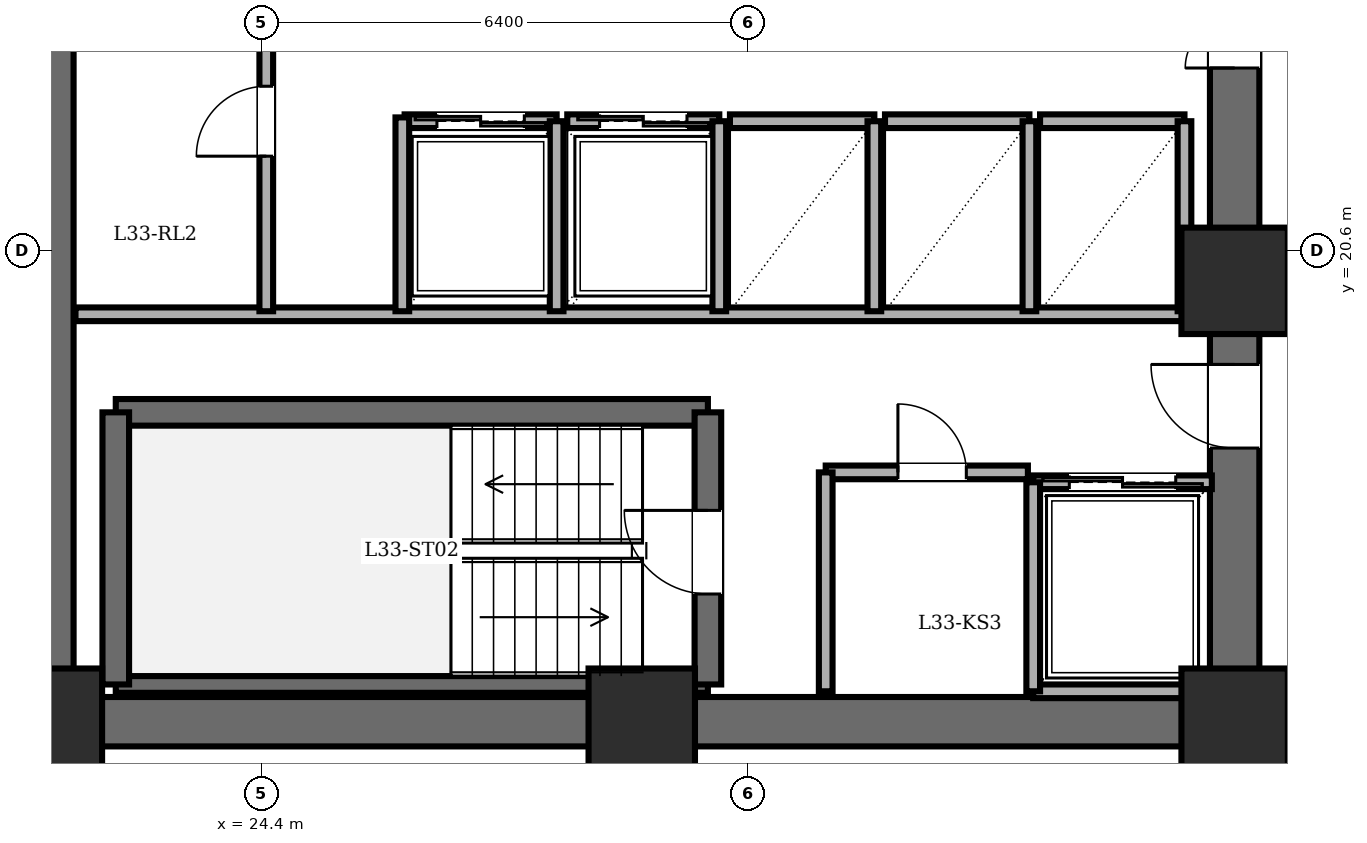
"""IFC4 building model, lengths in metres.
Left out: names, types, materials, properties, quantities, classifications, styles, units other than length and angle.
Written with IfcOpenShell. Run it as: python <this file> out.ifc"""

import sys

from ifc_helpers import new_model, si_unit, direction, frame, frame_2d, origin, origin_2d, place, context, subcontext, project, spatial, rectangle, extrude, element, fill, save


model = new_model("IFC4")
c1 = context("Model", 3, precision=1e-05, world=origin(), true_north=direction((0.0, 1.0)))
c2 = subcontext(c1, "Body", "Model", "MODEL_VIEW")
j1 = project(units=[si_unit("LENGTHUNIT", "METRE"), si_unit("PLANEANGLEUNIT", "RADIAN")], contexts=[c1])
p1 = place(None, origin())
s1 = spatial("IfcSite", under=j1, at=p1, CompositionType="ELEMENT")
p2 = place(p1, origin())
s2 = spatial("IfcBuilding", under=s1, at=p2, CompositionType="ELEMENT")
p3 = place(p2, frame((0.0, 0.0, 125.9)))
s3 = spatial("IfcBuildingStorey", under=s2, at=p3, CompositionType="ELEMENT", Elevation=125.9)
for number, where, z_axis, x_axis in (
    (1, (21.6, 14.4, 0.0), (0.0, 0.0, 1.0), (1.0, 0.0, 0.0)),
    (2, (29.4, 14.4, 0.0), (0.0, 0.0, 1.0), (1.0, 0.0, 0.0)),
    (3, (37.2, 14.4, 0.0), (0.0, 0.0, 1.0), (1.0, 0.0, 0.0)),
    (4, (37.2, 20.2, 0.0), (0.0, 0.0, 1.0), (1.0, 0.0, 0.0)),
):
    element("IfcColumn", number, at=place(p3, frame(where, z_axis=z_axis, x_axis=x_axis)), inside=s3, PredefinedType="COLUMN", context=c2, shape_type="SweptSolid", body=[
        extrude(rectangle(XDim=1.4, YDim=1.4, at=origin_2d()), origin(), (0.0, 0.0, 1.0), 3.6),
    ])
p4 = place(p3, frame((21.6, 14.4, 0.0), z_axis=(0.0, 0.0, 1.0), x_axis=(0.0, 1.0, 0.0)))
e5 = element("IfcWall", 5, at=p4, inside=s3, PredefinedType="SHEAR", context=c2, shape_type="SweptSolid", body=[
    extrude(rectangle(XDim=19.2, YDim=0.65, at=frame_2d((9.6, 0.0))), origin(), (0.0, 0.0, 1.0), 3.4),
])
p5 = place(p3, frame((37.2, 14.4, 0.0), z_axis=(0.0, 0.0, 1.0), x_axis=(-1.0, 0.0, 0.0)))
e6 = element("IfcWall", 6, at=p5, inside=s3, PredefinedType="SHEAR", context=c2, shape_type="SweptSolid", body=[
    extrude(rectangle(XDim=15.6, YDim=0.65, at=frame_2d((7.8, 0.0))), origin(), (0.0, 0.0, 1.0), 3.4),
])
p6 = place(p3, frame((37.2, 14.4, 0.0), z_axis=(0.0, 0.0, 1.0), x_axis=(0.0, 1.0, 0.0)))
e7 = element("IfcWall", 7, at=p6, inside=s3, PredefinedType="SHEAR", context=c2, shape_type="SweptSolid", body=[
    extrude(rectangle(XDim=19.2, YDim=0.65, at=frame_2d((9.6, 0.0))), origin(), (0.0, 0.0, 1.0), 3.4),
])
p7 = place(p6, frame((15.8, 0.0, 0.0)))
e8 = element("IfcOpeningElement", 8, at=p7, cuts=e7, PredefinedType="OPENING", context=c2, shape_type="SweptSolid", body=[
    extrude(rectangle(XDim=1.15, YDim=2.15, at=frame_2d((0.575, 1.075))), frame((0.0, 0.335, 0.0), z_axis=(0.0, -1.0, 0.0), x_axis=(1.0, 0.0, 0.0)), (0.0, 0.0, 1.0), 0.67),
])
p8 = place(p6, frame((3.6, 0.0, 0.0)))
e9 = element("IfcOpeningElement", 9, at=p8, cuts=e7, PredefinedType="OPENING", context=c2, shape_type="SweptSolid", body=[
    extrude(rectangle(XDim=1.1, YDim=2.15, at=frame_2d((0.55, 1.075))), frame((0.0, 0.335, 0.0), z_axis=(0.0, -1.0, 0.0), x_axis=(1.0, 0.0, 0.0)), (0.0, 0.0, 1.0), 0.67),
])
p9 = place(p6, frame((8.6, 0.0, 0.0)))
e10 = element("IfcOpeningElement", 10, at=p9, cuts=e7, PredefinedType="OPENING", context=c2, shape_type="SweptSolid", body=[
    extrude(rectangle(XDim=1.3, YDim=2.2, at=frame_2d((0.65, 1.1))), frame((0.0, 0.335, 0.0), z_axis=(0.0, -1.0, 0.0), x_axis=(1.0, 0.0, 0.0)), (0.0, 0.0, 1.0), 0.67),
])
p10 = place(p3, frame((22.48, 18.47, 0.0), z_axis=(0.0, 0.0, 1.0), x_axis=(1.0, 0.0, 0.0)))
e11 = element("IfcWall", 11, at=p10, inside=s3, PredefinedType="SOLIDWALL", context=c2, shape_type="SweptSolid", body=[
    extrude(rectangle(XDim=7.79, YDim=0.35, at=frame_2d((3.895, 0.0))), origin(), (0.0, 0.0, 1.0), 3.4),
])
p11 = place(p3, frame((22.48, 14.89, 0.0), z_axis=(0.0, 0.0, 1.0), x_axis=(1.0, 0.0, 0.0)))
e12 = element("IfcWall", 12, at=p11, inside=s3, PredefinedType="PARTITIONING", context=c2, shape_type="SweptSolid", body=[
    extrude(rectangle(XDim=7.79, YDim=0.22, at=frame_2d((3.895, 0.0))), origin(), (0.0, 0.0, 1.0), 3.4),
])
p12 = place(p3, frame((22.48, 14.89, 0.0), z_axis=(0.0, 0.0, 1.0), x_axis=(0.0, 1.0, 0.0)))
e13 = element("IfcWall", 13, at=p12, inside=s3, PredefinedType="SOLIDWALL", context=c2, shape_type="SweptSolid", body=[
    extrude(rectangle(XDim=3.58, YDim=0.35, at=frame_2d((1.79, 0.0))), origin(), (0.0, 0.0, 1.0), 3.4),
])
p13 = place(p3, frame((30.27, 14.89, 0.0), z_axis=(0.0, 0.0, 1.0), x_axis=(0.0, 1.0, 0.0)))
e14 = element("IfcWall", 14, at=p13, inside=s3, PredefinedType="SOLIDWALL", context=c2, shape_type="SweptSolid", body=[
    extrude(rectangle(XDim=3.58, YDim=0.35, at=frame_2d((1.79, 0.0))), origin(), (0.0, 0.0, 1.0), 3.4),
])
p14 = place(p13, frame((1.19, 0.0, 0.0)))
e15 = element("IfcOpeningElement", 15, at=p14, cuts=e14, PredefinedType="OPENING", context=c2, shape_type="SweptSolid", body=[
    extrude(rectangle(XDim=1.1, YDim=2.15, at=frame_2d((0.55, 1.075))), frame((0.0, 0.185, 0.0), z_axis=(0.0, -1.0, 0.0), x_axis=(1.0, 0.0, 0.0)), (0.0, 0.0, 1.0), 0.37),
])
p15 = place(p3, frame((21.95, 19.76, 0.0), z_axis=(0.0, 0.0, 1.0), x_axis=(1.0, 0.0, 0.0)))
e16 = element("IfcWall", 16, at=p15, inside=s3, PredefinedType="PARTITIONING", context=c2, shape_type="SweptSolid", body=[
    extrude(rectangle(XDim=14.87, YDim=0.18, at=frame_2d((7.435, 0.0))), origin(), (0.0, 0.0, 1.0), 3.4),
])
p16 = place(p3, frame((31.82, 17.68, 0.0), z_axis=(0.0, 0.0, 1.0), x_axis=(1.0, 0.0, 0.0)))
e17 = element("IfcWall", 17, at=p16, inside=s3, PredefinedType="PARTITIONING", context=c2, shape_type="SweptSolid", body=[
    extrude(rectangle(XDim=2.66, YDim=0.18, at=frame_2d((1.33, 0.0))), origin(), (0.0, 0.0, 1.0), 3.4),
])
p17 = place(p16, frame((0.95, 0.0, 0.0)))
e18 = element("IfcOpeningElement", 18, at=p17, cuts=e17, PredefinedType="OPENING", context=c2, shape_type="SweptSolid", body=[
    extrude(rectangle(XDim=0.9, YDim=2.05, at=frame_2d((0.45, 1.025))), frame((0.0, 0.1, 0.0), z_axis=(0.0, -1.0, 0.0), x_axis=(1.0, 0.0, 0.0)), (0.0, 0.0, 1.0), 0.2),
])
p18 = place(p3, frame((31.82, 14.8, 0.0), z_axis=(0.0, 0.0, 1.0), x_axis=(0.0, 1.0, 0.0)))
e19 = element("IfcWall", 19, at=p18, inside=s3, PredefinedType="PARTITIONING", context=c2, shape_type="SweptSolid", body=[
    extrude(rectangle(XDim=2.88, YDim=0.18, at=frame_2d((1.44, 0.0))), origin(), (0.0, 0.0, 1.0), 3.4),
])
p19 = place(p3, frame((34.55, 17.55, 0.0), z_axis=(0.0, 0.0, 1.0), x_axis=(1.0, 0.0, 0.0)))
e20 = element("IfcWall", 20, at=p19, inside=s3, PredefinedType="PARTITIONING", context=c2, shape_type="SweptSolid", body=[
    extrude(rectangle(XDim=2.35, YDim=0.18, at=frame_2d((1.175, 0.0))), origin(), (0.0, 0.0, 1.0), 3.4),
])
p20 = place(p19, frame((0.475, 0.0, 0.0)))
e21 = element("IfcOpeningElement", 21, at=p20, cuts=e20, PredefinedType="OPENING", context=c2, shape_type="SweptSolid", body=[
    extrude(rectangle(XDim=1.4, YDim=2.3, at=frame_2d((0.7, 1.15))), frame((0.0, 0.1, 0.0), z_axis=(0.0, -1.0, 0.0), x_axis=(1.0, 0.0, 0.0)), (0.0, 0.0, 1.0), 0.2),
])
p21 = place(p3, frame((36.9, 14.8, 0.0), z_axis=(0.0, 0.0, 1.0), x_axis=(-1.0, 0.0, 0.0)))
e22 = element("IfcWall", 22, at=p21, inside=s3, PredefinedType="PARTITIONING", context=c2, shape_type="SweptSolid", body=[
    extrude(rectangle(XDim=2.35, YDim=0.18, at=frame_2d((1.175, 0.0))), origin(), (0.0, 0.0, 1.0), 3.4),
])
p22 = place(p3, frame((34.55, 17.55, 0.0), z_axis=(0.0, 0.0, 1.0), x_axis=(0.0, -1.0, 0.0)))
e23 = element("IfcWall", 23, at=p22, inside=s3, PredefinedType="PARTITIONING", context=c2, shape_type="SweptSolid", body=[
    extrude(rectangle(XDim=2.75, YDim=0.18, at=frame_2d((1.375, 0.0))), origin(), (0.0, 0.0, 1.0), 3.4),
])
p23 = place(p3, frame((26.28, 22.3, 0.0), z_axis=(0.0, 0.0, 1.0), x_axis=(1.0, 0.0, 0.0)))
e24 = element("IfcWall", 24, at=p23, inside=s3, PredefinedType="PARTITIONING", context=c2, shape_type="SweptSolid", body=[
    extrude(rectangle(XDim=2.0, YDim=0.18, at=frame_2d((1.0, 0.0))), origin(), (0.0, 0.0, 1.0), 3.4),
])
p24 = place(p23, frame((0.425, 0.0, 0.0)))
e25 = element("IfcOpeningElement", 25, at=p24, cuts=e24, PredefinedType="OPENING", context=c2, shape_type="SweptSolid", body=[
    extrude(rectangle(XDim=1.15, YDim=2.2, at=frame_2d((0.575, 1.1))), frame((0.0, 0.1, 0.0), z_axis=(0.0, -1.0, 0.0), x_axis=(1.0, 0.0, 0.0)), (0.0, 0.0, 1.0), 0.2),
])
p25 = place(p3, frame((28.28, 19.8, 0.0), z_axis=(0.0, 0.0, 1.0), x_axis=(0.0, 1.0, 0.0)))
e26 = element("IfcWall", 26, at=p25, inside=s3, PredefinedType="PARTITIONING", context=c2, shape_type="SweptSolid", body=[
    extrude(rectangle(XDim=2.5, YDim=0.18, at=frame_2d((1.25, 0.0))), origin(), (0.0, 0.0, 1.0), 3.4),
])
p26 = place(p3, frame((28.42, 22.3, 0.0), z_axis=(0.0, 0.0, 1.0), x_axis=(1.0, 0.0, 0.0)))
e27 = element("IfcWall", 27, at=p26, inside=s3, PredefinedType="PARTITIONING", context=c2, shape_type="SweptSolid", body=[
    extrude(rectangle(XDim=2.0, YDim=0.18, at=frame_2d((1.0, 0.0))), origin(), (0.0, 0.0, 1.0), 3.4),
])
p27 = place(p26, frame((0.425, 0.0, 0.0)))
e28 = element("IfcOpeningElement", 28, at=p27, cuts=e27, PredefinedType="OPENING", context=c2, shape_type="SweptSolid", body=[
    extrude(rectangle(XDim=1.15, YDim=2.2, at=frame_2d((0.575, 1.1))), frame((0.0, 0.1, 0.0), z_axis=(0.0, -1.0, 0.0), x_axis=(1.0, 0.0, 0.0)), (0.0, 0.0, 1.0), 0.2),
])
p28 = place(p3, frame((30.42, 19.8, 0.0), z_axis=(0.0, 0.0, 1.0), x_axis=(0.0, 1.0, 0.0)))
e29 = element("IfcWall", 29, at=p28, inside=s3, PredefinedType="PARTITIONING", context=c2, shape_type="SweptSolid", body=[
    extrude(rectangle(XDim=2.5, YDim=0.18, at=frame_2d((1.25, 0.0))), origin(), (0.0, 0.0, 1.0), 3.4),
])
p29 = place(p3, frame((30.56, 22.3, 0.0), z_axis=(0.0, 0.0, 1.0), x_axis=(1.0, 0.0, 0.0)))
e30 = element("IfcWall", 30, at=p29, inside=s3, PredefinedType="PARTITIONING", context=c2, shape_type="SweptSolid", body=[
    extrude(rectangle(XDim=1.9, YDim=0.18, at=frame_2d((0.95, 0.0))), origin(), (0.0, 0.0, 1.0), 3.4),
])
p30 = place(p3, frame((32.46, 19.8, 0.0), z_axis=(0.0, 0.0, 1.0), x_axis=(0.0, 1.0, 0.0)))
e31 = element("IfcWall", 31, at=p30, inside=s3, PredefinedType="PARTITIONING", context=c2, shape_type="SweptSolid", body=[
    extrude(rectangle(XDim=2.5, YDim=0.18, at=frame_2d((1.25, 0.0))), origin(), (0.0, 0.0, 1.0), 3.4),
])
p31 = place(p3, frame((32.6, 22.3, 0.0), z_axis=(0.0, 0.0, 1.0), x_axis=(1.0, 0.0, 0.0)))
e32 = element("IfcWall", 32, at=p31, inside=s3, PredefinedType="PARTITIONING", context=c2, shape_type="SweptSolid", body=[
    extrude(rectangle(XDim=1.9, YDim=0.18, at=frame_2d((0.95, 0.0))), origin(), (0.0, 0.0, 1.0), 3.4),
])
p32 = place(p3, frame((34.5, 19.8, 0.0), z_axis=(0.0, 0.0, 1.0), x_axis=(0.0, 1.0, 0.0)))
e33 = element("IfcWall", 33, at=p32, inside=s3, PredefinedType="PARTITIONING", context=c2, shape_type="SweptSolid", body=[
    extrude(rectangle(XDim=2.5, YDim=0.18, at=frame_2d((1.25, 0.0))), origin(), (0.0, 0.0, 1.0), 3.4),
])
p33 = place(p3, frame((34.64, 22.3, 0.0), z_axis=(0.0, 0.0, 1.0), x_axis=(1.0, 0.0, 0.0)))
e34 = element("IfcWall", 34, at=p33, inside=s3, PredefinedType="PARTITIONING", context=c2, shape_type="SweptSolid", body=[
    extrude(rectangle(XDim=1.9, YDim=0.18, at=frame_2d((0.95, 0.0))), origin(), (0.0, 0.0, 1.0), 3.4),
])
p34 = place(p3, frame((36.54, 19.8, 0.0), z_axis=(0.0, 0.0, 1.0), x_axis=(0.0, 1.0, 0.0)))
e35 = element("IfcWall", 35, at=p34, inside=s3, PredefinedType="PARTITIONING", context=c2, shape_type="SweptSolid", body=[
    extrude(rectangle(XDim=2.5, YDim=0.18, at=frame_2d((1.25, 0.0))), origin(), (0.0, 0.0, 1.0), 3.4),
])
p35 = place(p3, frame((24.46, 19.8, 0.0), z_axis=(0.0, 0.0, 1.0), x_axis=(0.0, 1.0, 0.0)))
e36 = element("IfcWall", 36, at=p35, inside=s3, PredefinedType="PARTITIONING", context=c2, shape_type="SweptSolid", body=[
    extrude(rectangle(XDim=5.0, YDim=0.18, at=frame_2d((2.5, 0.0))), origin(), (0.0, 0.0, 1.0), 3.4),
])
p36 = place(p35, frame((2.04, 0.0, 0.0)))
e37 = element("IfcOpeningElement", 37, at=p36, cuts=e36, PredefinedType="OPENING", context=c2, shape_type="SweptSolid", body=[
    extrude(rectangle(XDim=0.92, YDim=2.1, at=frame_2d((0.46, 1.05))), frame((0.0, 0.1, 0.0), z_axis=(0.0, -1.0, 0.0), x_axis=(1.0, 0.0, 0.0)), (0.0, 0.0, 1.0), 0.2),
])
p37 = place(p3, frame((26.25, 19.8, 0.0), z_axis=(0.0, 0.0, 1.0), x_axis=(0.0, 1.0, 0.0)))
e38 = element("IfcWall", 38, at=p37, inside=s3, PredefinedType="PARTITIONING", context=c2, shape_type="SweptSolid", body=[
    extrude(rectangle(XDim=2.55, YDim=0.18, at=frame_2d((1.275, 0.0))), origin(), (0.0, 0.0, 1.0), 3.4),
])
p38 = place(p14, origin())
e39 = element("IfcDoor", 39, at=p38, inside=s3, OperationType="SINGLE_SWING_RIGHT", PredefinedType="DOOR", context=c2, shape_type="SweptSolid", body=[
    extrude(rectangle(XDim=1.1, YDim=2.15, at=frame_2d((0.55, 1.075))), frame((0.0, 0.025, 0.0), z_axis=(0.0, -1.0, 0.0), x_axis=(1.0, 0.0, 0.0)), (0.0, 0.0, 1.0), 0.05),
])
fill(e15, e39)
p39 = place(p8, origin())
e40 = element("IfcDoor", 40, at=p39, inside=s3, OperationType="SINGLE_SWING_RIGHT", PredefinedType="DOOR", context=c2, shape_type="SweptSolid", body=[
    extrude(rectangle(XDim=1.1, YDim=2.15, at=frame_2d((0.55, 1.075))), frame((0.0, 0.025, 0.0), z_axis=(0.0, -1.0, 0.0), x_axis=(1.0, 0.0, 0.0)), (0.0, 0.0, 1.0), 0.05),
])
fill(e9, e40)
p40 = place(p17, origin())
e41 = element("IfcDoor", 41, at=p40, inside=s3, OperationType="SINGLE_SWING_LEFT", PredefinedType="DOOR", context=c2, shape_type="SweptSolid", body=[
    extrude(rectangle(XDim=0.9, YDim=2.05, at=frame_2d((0.45, 1.025))), frame((0.0, 0.025, 0.0), z_axis=(0.0, -1.0, 0.0), x_axis=(1.0, 0.0, 0.0)), (0.0, 0.0, 1.0), 0.05),
])
fill(e18, e41)
p41 = place(p20, origin())
e42 = element("IfcDoor", 42, at=p41, inside=s3, OperationType="DOUBLE_DOOR_SLIDING", PredefinedType="DOOR", context=c2, shape_type="SweptSolid", body=[
    extrude(rectangle(XDim=1.4, YDim=2.3, at=frame_2d((0.7, 1.15))), frame((0.0, 0.025, 0.0), z_axis=(0.0, -1.0, 0.0), x_axis=(1.0, 0.0, 0.0)), (0.0, 0.0, 1.0), 0.05),
])
fill(e21, e42)
p42 = place(p24, origin())
e43 = element("IfcDoor", 43, at=p42, inside=s3, OperationType="DOUBLE_DOOR_SLIDING", PredefinedType="DOOR", context=c2, shape_type="SweptSolid", body=[
    extrude(rectangle(XDim=1.15, YDim=2.2, at=frame_2d((0.575, 1.1))), frame((0.0, 0.025, 0.0), z_axis=(0.0, -1.0, 0.0), x_axis=(1.0, 0.0, 0.0)), (0.0, 0.0, 1.0), 0.05),
])
fill(e25, e43)
p43 = place(p27, origin())
e44 = element("IfcDoor", 44, at=p43, inside=s3, OperationType="DOUBLE_DOOR_SLIDING", PredefinedType="DOOR", context=c2, shape_type="SweptSolid", body=[
    extrude(rectangle(XDim=1.15, YDim=2.2, at=frame_2d((0.575, 1.1))), frame((0.0, 0.025, 0.0), z_axis=(0.0, -1.0, 0.0), x_axis=(1.0, 0.0, 0.0)), (0.0, 0.0, 1.0), 0.05),
])
fill(e28, e44)
p44 = place(p36, origin())
e45 = element("IfcDoor", 45, at=p44, inside=s3, OperationType="SINGLE_SWING_LEFT", PredefinedType="DOOR", context=c2, shape_type="SweptSolid", body=[
    extrude(rectangle(XDim=0.92, YDim=2.1, at=frame_2d((0.46, 1.05))), frame((0.0, 0.025, 0.0), z_axis=(0.0, -1.0, 0.0), x_axis=(1.0, 0.0, 0.0)), (0.0, 0.0, 1.0), 0.05),
])
fill(e37, e45)
p45 = place(p9, origin())
e46 = element("IfcDoor", 46, at=p45, inside=s3, OperationType="DOUBLE_DOOR_SINGLE_SWING", PredefinedType="DOOR", context=c2, shape_type="SweptSolid", body=[
    extrude(rectangle(XDim=1.3, YDim=2.2, at=frame_2d((0.65, 1.1))), frame((0.0, 0.025, 0.0), z_axis=(0.0, -1.0, 0.0), x_axis=(1.0, 0.0, 0.0)), (0.0, 0.0, 1.0), 0.05),
])
fill(e10, e46)
save(model, sys.argv[1])
